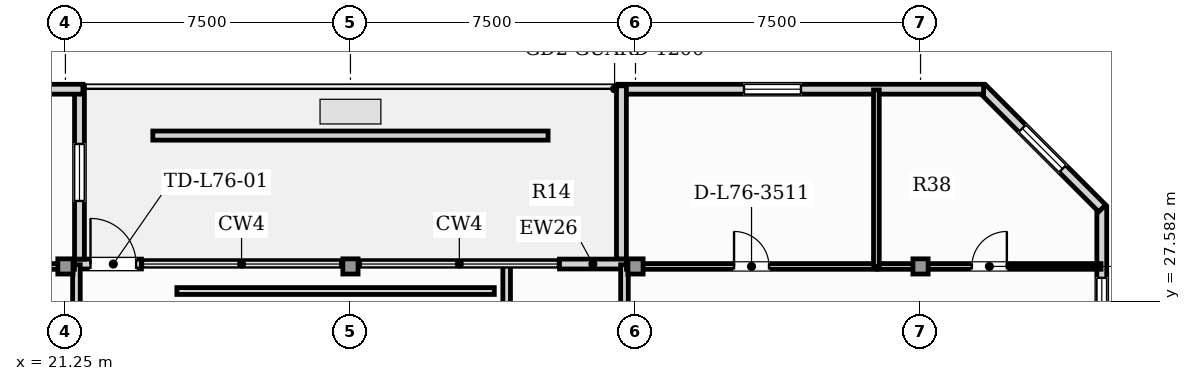
"""IFC4 building model, lengths in metres.
Left out: names, types, materials, properties, quantities, classifications, styles, units other than length and angle.
Written with IfcOpenShell. Run it as: python <this file> out.ifc"""

import sys

from ifc_helpers import new_model, si_unit, direction, frame, frame_2d, origin, origin_2d, place, context, subcontext, project, spatial, rectangle, hollow_rectangle, extrude, element, fill, save


model = new_model("IFC4")
c1 = context("Model", 3, precision=1e-05, world=origin(), true_north=direction((0.0, 1.0)))
c2 = subcontext(c1, "Body", "Model", "MODEL_VIEW")
j1 = project(units=[si_unit("LENGTHUNIT", "METRE"), si_unit("PLANEANGLEUNIT", "RADIAN")], contexts=[c1])
p1 = place(None, origin())
s1 = spatial("IfcSite", under=j1, at=p1, CompositionType="ELEMENT")
p2 = place(p1, origin())
s2 = spatial("IfcBuilding", under=s1, at=p2, CompositionType="ELEMENT")
p3 = place(p2, frame((0.0, 0.0, 308.0)))
s3 = spatial("IfcBuildingStorey", under=s2, at=p3, CompositionType="ELEMENT", Elevation=308.0)
for number, where, z_axis, x_axis in (
    (1, (21.25, 28.5, 0.0), (0.0, 0.0, 1.0), (1.0, 0.0, 0.0)),
    (2, (28.75, 28.5, 0.0), (0.0, 0.0, 1.0), (1.0, 0.0, 0.0)),
    (3, (36.25, 28.5, 0.0), (0.0, 0.0, 1.0), (1.0, 0.0, 0.0)),
    (4, (43.75, 28.5, 0.0), (0.0, 0.0, 1.0), (1.0, 0.0, 0.0)),
):
    element("IfcColumn", number, at=place(p3, frame(where, z_axis=z_axis, x_axis=x_axis)), inside=s3, PredefinedType="COLUMN", context=c2, shape_type="SweptSolid", body=[
        extrude(hollow_rectangle(XDim=0.4, YDim=0.4, WallThickness=0.02, at=origin_2d()), origin(), (0.0, 0.0, 1.0), 5.05),
    ])
p4 = place(p3, frame((48.519, 3.24, 0.0), z_axis=(0.0, 0.0, 1.0), x_axis=(0.0, 1.0, 0.0)))
e5 = element("IfcWall", 5, at=p4, inside=s3, PredefinedType="SOLIDWALL", context=c2, shape_type="SweptSolid", body=[
    extrude(rectangle(XDim=26.813, YDim=0.26, at=frame_2d((13.406, 0.0))), origin(), (0.0, 0.0, 1.0), 4.85),
])
p5 = place(p4, frame((24.06, 0.0, 0.95)))
e6 = element("IfcOpeningElement", 6, at=p5, cuts=e5, PredefinedType="OPENING", context=c2, shape_type="SweptSolid", body=[
    extrude(rectangle(XDim=0.9, YDim=1.5, at=frame_2d((0.45, 0.75))), frame((0.0, 0.14, 0.0), z_axis=(0.0, -1.0, 0.0), x_axis=(1.0, 0.0, 0.0)), (0.0, 0.0, 1.0), 0.28),
])
p6 = place(p4, frame((10.445, 0.0, 0.9)))
e7 = element("IfcOpeningElement", 7, at=p6, cuts=e5, PredefinedType="OPENING", context=c2, shape_type="SweptSolid", body=[
    extrude(rectangle(XDim=1.5, YDim=1.95, at=frame_2d((0.75, 0.975))), frame((0.0, 0.14, 0.0), z_axis=(0.0, -1.0, 0.0), x_axis=(1.0, 0.0, 0.0)), (0.0, 0.0, 1.0), 0.28),
])
p7 = place(p4, frame((17.51, 0.0, 0.9)))
e8 = element("IfcOpeningElement", 8, at=p7, cuts=e5, PredefinedType="OPENING", context=c2, shape_type="SweptSolid", body=[
    extrude(rectangle(XDim=1.5, YDim=1.95, at=frame_2d((0.75, 0.975))), frame((0.0, 0.14, 0.0), z_axis=(0.0, -1.0, 0.0), x_axis=(1.0, 0.0, 0.0)), (0.0, 0.0, 1.0), 0.28),
])
p8 = place(p3, frame((48.529, 30.03, 0.0), z_axis=(0.0, 0.0, 1.0), x_axis=(-0.707134240044, 0.707079321262, 0.0)))
e9 = element("IfcWall", 9, at=p8, inside=s3, PredefinedType="SOLIDWALL", context=c2, shape_type="SweptSolid", body=[
    extrude(rectangle(XDim=4.446, YDim=0.26, at=frame_2d((2.223, 0.0))), origin(), (0.0, 0.0, 1.0), 4.85),
])
p9 = place(p8, frame((1.473, 0.0, 0.9)))
e10 = element("IfcOpeningElement", 10, at=p9, cuts=e9, PredefinedType="OPENING", context=c2, shape_type="SweptSolid", body=[
    extrude(rectangle(XDim=1.5, YDim=1.95, at=frame_2d((0.75, 0.975))), frame((0.0, 0.14, 0.0), z_axis=(0.0, -1.0, 0.0), x_axis=(1.0, 0.0, 0.0)), (0.0, 0.0, 1.0), 0.28),
])
p10 = place(p3, frame((45.409, 33.163, 0.0), z_axis=(0.0, 0.0, 1.0), x_axis=(-1.0, 0.0, 0.0)))
e11 = element("IfcWall", 11, at=p10, inside=s3, PredefinedType="SOLIDWALL", context=c2, shape_type="SweptSolid", body=[
    extrude(rectangle(XDim=9.619, YDim=0.26, at=frame_2d((4.81, 0.0))), origin(), (0.0, 0.0, 1.0), 4.85),
])
p11 = place(p10, frame((4.805, 0.0, 0.9)))
e12 = element("IfcOpeningElement", 12, at=p11, cuts=e11, PredefinedType="OPENING", context=c2, shape_type="SweptSolid", body=[
    extrude(rectangle(XDim=1.5, YDim=1.95, at=frame_2d((0.75, 0.975))), frame((0.0, 0.14, 0.0), z_axis=(0.0, -1.0, 0.0), x_axis=(1.0, 0.0, 0.0)), (0.0, 0.0, 1.0), 0.28),
])
p12 = place(p3, frame((35.88, 33.253, 0.0), z_axis=(0.0, 0.0, 1.0), x_axis=(0.0, -1.0, 0.0)))
e13 = element("IfcWall", 13, at=p12, inside=s3, PredefinedType="SOLIDWALL", context=c2, shape_type="SweptSolid", body=[
    extrude(rectangle(XDim=4.56, YDim=0.26, at=frame_2d((2.28, 0.0))), origin(), (0.0, 0.0, 1.0), 4.85),
])
p13 = place(p3, frame((21.49, 28.563, 0.0), z_axis=(0.0, 0.0, 1.0), x_axis=(1.0, 0.0, 0.0)))
e14 = element("IfcWall", 14, at=p13, inside=s3, PredefinedType="SOLIDWALL", context=c2, shape_type="SweptSolid", body=[
    extrude(rectangle(XDim=1.76, YDim=0.26, at=frame_2d((0.88, 0.0))), origin(), (0.0, 0.0, 1.0), 4.85),
])
p14 = place(p13, frame((0.42, 0.0, 0.0)))
e15 = element("IfcOpeningElement", 15, at=p14, cuts=e14, PredefinedType="OPENING", context=c2, shape_type="SweptSolid", body=[
    extrude(rectangle(XDim=1.2, YDim=2.2, at=frame_2d((0.6, 1.1))), frame((0.0, 0.14, 0.0), z_axis=(0.0, -1.0, 0.0), x_axis=(1.0, 0.0, 0.0)), (0.0, 0.0, 1.0), 0.28),
])
p15 = place(p3, frame((34.25, 28.563, 0.0), z_axis=(0.0, 0.0, 1.0), x_axis=(1.0, 0.0, 0.0)))
e16 = element("IfcWall", 16, at=p15, inside=s3, PredefinedType="SOLIDWALL", context=c2, shape_type="SweptSolid", body=[
    extrude(rectangle(XDim=1.76, YDim=0.26, at=frame_2d((0.88, 0.0))), origin(), (0.0, 0.0, 1.0), 4.85),
])
p16 = place(p3, frame((21.62, 28.693, 0.0), z_axis=(0.0, 0.0, 1.0), x_axis=(0.0, 1.0, 0.0)))
e17 = element("IfcWall", 17, at=p16, inside=s3, PredefinedType="SOLIDWALL", context=c2, shape_type="SweptSolid", body=[
    extrude(rectangle(XDim=4.56, YDim=0.26, at=frame_2d((2.28, 0.0))), origin(), (0.0, 0.0, 1.0), 4.85),
])
p17 = place(p16, frame((1.53, 0.0, 0.9)))
e18 = element("IfcOpeningElement", 18, at=p17, cuts=e17, PredefinedType="OPENING", context=c2, shape_type="SweptSolid", body=[
    extrude(rectangle(XDim=1.5, YDim=1.95, at=frame_2d((0.75, 0.975))), frame((0.0, 0.14, 0.0), z_axis=(0.0, -1.0, 0.0), x_axis=(1.0, 0.0, 0.0)), (0.0, 0.0, 1.0), 0.28),
])
p18 = place(p3, frame((21.71, 33.163, 0.0), z_axis=(0.0, 0.0, 1.0), x_axis=(-1.0, 0.0, 0.0)))
e19 = element("IfcWall", 19, at=p18, inside=s3, PredefinedType="SOLIDWALL", context=c2, shape_type="SweptSolid", body=[
    extrude(rectangle(XDim=9.619, YDim=0.26, at=frame_2d((4.81, 0.0))), origin(), (0.0, 0.0, 1.0), 4.85),
])
p19 = place(p18, frame((6.115, 0.0, 0.9)))
e20 = element("IfcOpeningElement", 20, at=p19, cuts=e19, PredefinedType="OPENING", context=c2, shape_type="SweptSolid", body=[
    extrude(rectangle(XDim=1.5, YDim=1.95, at=frame_2d((0.75, 0.975))), frame((0.0, 0.14, 0.0), z_axis=(0.0, -1.0, 0.0), x_axis=(1.0, 0.0, 0.0)), (0.0, 0.0, 1.0), 0.28),
])
p20 = place(p3, frame((23.55, 31.943, 0.0), z_axis=(0.0, 0.0, 1.0), x_axis=(1.0, 0.0, 0.0)))
e21 = element("IfcWall", 21, at=p20, inside=s3, PredefinedType="PARAPET", context=c2, shape_type="SweptSolid", body=[
    extrude(rectangle(XDim=10.4, YDim=0.24, at=frame_2d((5.2, 0.0))), origin(), (0.0, 0.0, 1.0), 0.55),
])
p21 = place(p3, frame((32.86, 16.685, 0.0), z_axis=(0.0, 0.0, 1.0), x_axis=(0.0, 1.0, 0.0)))
e22 = element("IfcWall", 22, at=p21, inside=s3, PredefinedType="PARTITIONING", context=c2, shape_type="SweptSolid", body=[
    extrude(rectangle(XDim=11.86, YDim=0.2, at=frame_2d((5.93, 0.0))), origin(), (0.0, 0.0, 1.0), 4.85),
])
p22 = place(p21, frame((5.47, 0.0, 0.0)))
e23 = element("IfcOpeningElement", 23, at=p22, cuts=e22, PredefinedType="OPENING", context=c2, shape_type="SweptSolid", body=[
    extrude(rectangle(XDim=0.92, YDim=2.1, at=frame_2d((0.46, 1.05))), frame((0.0, 0.11, 0.0), z_axis=(0.0, -1.0, 0.0), x_axis=(1.0, 0.0, 0.0)), (0.0, 0.0, 1.0), 0.22),
])
for number, where, z_axis, x_axis in (
    (24, (21.54, 26.995, 0.0), (0.0, 0.0, 1.0), (0.0, 1.0, 0.0)),
    (25, (35.96, 26.995, 0.0), (0.0, 0.0, 1.0), (0.0, 1.0, 0.0)),
):
    element("IfcWall", number, at=place(p3, frame(where, z_axis=z_axis, x_axis=x_axis)), inside=s3, PredefinedType="PARTITIONING", context=c2, shape_type="SweptSolid", body=[
        extrude(rectangle(XDim=1.549, YDim=0.2, at=frame_2d((0.774, 0.0))), origin(), (0.0, 0.0, 1.0), 4.85),
    ])
p23 = place(p3, frame((16.304, 28.5, 0.0), z_axis=(0.0, 0.0, 1.0), x_axis=(1.0, 0.0, 0.0)))
e26 = element("IfcWall", 26, at=p23, inside=s3, PredefinedType="PARTITIONING", context=c2, shape_type="SweptSolid", body=[
    extrude(rectangle(XDim=5.183, YDim=0.15, at=frame_2d((2.591, 0.0))), origin(), (0.0, 0.0, 1.0), 4.317),
])
p24 = place(p23, frame((2.131, 0.0, 0.0)))
e27 = element("IfcOpeningElement", 27, at=p24, cuts=e26, PredefinedType="OPENING", context=c2, shape_type="SweptSolid", body=[
    extrude(rectangle(XDim=0.92, YDim=2.1, at=frame_2d((0.46, 1.05))), frame((0.0, 0.085, 0.0), z_axis=(0.0, -1.0, 0.0), x_axis=(1.0, 0.0, 0.0)), (0.0, 0.0, 1.0), 0.17),
])
p25 = place(p3, frame((36.013, 28.5, 0.0), z_axis=(0.0, 0.0, 1.0), x_axis=(1.0, 0.0, 0.0)))
e28 = element("IfcWall", 28, at=p25, inside=s3, PredefinedType="PARTITIONING", context=c2, shape_type="SweptSolid", body=[
    extrude(rectangle(XDim=6.58, YDim=0.15, at=frame_2d((3.29, 0.0))), origin(), (0.0, 0.0, 1.0), 4.317),
])
p26 = place(p25, frame((2.83, 0.0, 0.0)))
e29 = element("IfcOpeningElement", 29, at=p26, cuts=e28, PredefinedType="OPENING", context=c2, shape_type="SweptSolid", body=[
    extrude(rectangle(XDim=0.92, YDim=2.1, at=frame_2d((0.46, 1.05))), frame((0.0, 0.085, 0.0), z_axis=(0.0, -1.0, 0.0), x_axis=(1.0, 0.0, 0.0)), (0.0, 0.0, 1.0), 0.17),
])
p27 = place(p3, frame((42.623, 28.5, 0.0), z_axis=(0.0, 0.0, 1.0), x_axis=(1.0, 0.0, 0.0)))
e30 = element("IfcWall", 30, at=p27, inside=s3, PredefinedType="PARTITIONING", context=c2, shape_type="SweptSolid", body=[
    extrude(rectangle(XDim=5.876, YDim=0.15, at=frame_2d((2.938, 0.0))), origin(), (0.0, 0.0, 1.0), 4.317),
])
p28 = place(p27, frame((2.478, 0.0, 0.0)))
e31 = element("IfcOpeningElement", 31, at=p28, cuts=e30, PredefinedType="OPENING", context=c2, shape_type="SweptSolid", body=[
    extrude(rectangle(XDim=0.92, YDim=2.1, at=frame_2d((0.46, 1.05))), frame((0.0, 0.085, 0.0), z_axis=(0.0, -1.0, 0.0), x_axis=(1.0, 0.0, 0.0)), (0.0, 0.0, 1.0), 0.17),
])
p29 = place(p3, frame((42.588, 28.495, 0.0), z_axis=(0.0, 0.0, 1.0), x_axis=(0.0, 1.0, 0.0)))
e32 = element("IfcWall", 32, at=p29, inside=s3, PredefinedType="PARTITIONING", context=c2, shape_type="SweptSolid", body=[
    extrude(rectangle(XDim=4.648, YDim=0.15, at=frame_2d((2.324, 0.0))), origin(), (0.0, 0.0, 1.0), 4.85),
])
p30 = place(p3, frame((24.183, 27.853, 0.0), z_axis=(0.0, 0.0, 1.0), x_axis=(1.0, 0.0, 0.0)))
e33 = element("IfcWall", 33, at=p30, inside=s3, PredefinedType="PARTITIONING", context=c2, shape_type="SweptSolid", body=[
    extrude(rectangle(XDim=8.352, YDim=0.18, at=frame_2d((4.176, 0.0))), origin(), (0.0, 0.0, 1.0), 4.85),
])
p31 = place(p14, origin())
e34 = element("IfcDoor", 34, at=p31, inside=s3, OperationType="SINGLE_SWING_LEFT", PredefinedType="DOOR", context=c2, shape_type="SweptSolid", body=[
    extrude(rectangle(XDim=1.2, YDim=2.2, at=frame_2d((0.6, 1.1))), frame((0.0, 0.025, 0.0), z_axis=(0.0, -1.0, 0.0), x_axis=(1.0, 0.0, 0.0)), (0.0, 0.0, 1.0), 0.05),
])
fill(e15, e34)
p32 = place(p17, origin())
e35 = element("IfcWindow", 35, at=p32, inside=s3, PartitioningType="SINGLE_PANEL", PredefinedType="WINDOW", context=c2, shape_type="SweptSolid", body=[
    extrude(rectangle(XDim=1.5, YDim=1.95, at=frame_2d((0.75, 0.975))), frame((0.0, 0.03, 0.0), z_axis=(0.0, -1.0, 0.0), x_axis=(1.0, 0.0, 0.0)), (0.0, 0.0, 1.0), 0.06),
])
fill(e18, e35)
p33 = place(p5, origin())
e36 = element("IfcWindow", 36, at=p33, inside=s3, PartitioningType="SINGLE_PANEL", PredefinedType="WINDOW", context=c2, shape_type="SweptSolid", body=[
    extrude(rectangle(XDim=0.9, YDim=1.5, at=frame_2d((0.45, 0.75))), frame((0.0, 0.03, 0.0), z_axis=(0.0, -1.0, 0.0), x_axis=(1.0, 0.0, 0.0)), (0.0, 0.0, 1.0), 0.06),
])
fill(e6, e36)
p34 = place(p11, origin())
e37 = element("IfcWindow", 37, at=p34, inside=s3, PartitioningType="SINGLE_PANEL", PredefinedType="WINDOW", context=c2, shape_type="SweptSolid", body=[
    extrude(rectangle(XDim=1.5, YDim=1.95, at=frame_2d((0.75, 0.975))), frame((0.0, 0.03, 0.0), z_axis=(0.0, -1.0, 0.0), x_axis=(1.0, 0.0, 0.0)), (0.0, 0.0, 1.0), 0.06),
])
fill(e12, e37)
p35 = place(p9, origin())
e38 = element("IfcWindow", 38, at=p35, inside=s3, PartitioningType="SINGLE_PANEL", PredefinedType="WINDOW", context=c2, shape_type="SweptSolid", body=[
    extrude(rectangle(XDim=1.5, YDim=1.95, at=frame_2d((0.75, 0.975))), frame((0.0, 0.03, 0.0), z_axis=(0.0, -1.0, 0.0), x_axis=(1.0, 0.0, 0.0)), (0.0, 0.0, 1.0), 0.06),
])
fill(e10, e38)
p36 = place(p26, origin())
e39 = element("IfcDoor", 39, at=p36, inside=s3, OperationType="SINGLE_SWING_LEFT", PredefinedType="DOOR", context=c2, shape_type="SweptSolid", body=[
    extrude(rectangle(XDim=0.92, YDim=2.1, at=frame_2d((0.46, 1.05))), frame((0.0, 0.025, 0.0), z_axis=(0.0, -1.0, 0.0), x_axis=(1.0, 0.0, 0.0)), (0.0, 0.0, 1.0), 0.05),
])
fill(e29, e39)
p37 = place(p28, origin())
e40 = element("IfcDoor", 40, at=p37, inside=s3, OperationType="SINGLE_SWING_RIGHT", PredefinedType="DOOR", context=c2, shape_type="SweptSolid", body=[
    extrude(rectangle(XDim=0.92, YDim=2.1, at=frame_2d((0.46, 1.05))), frame((0.0, 0.025, 0.0), z_axis=(0.0, -1.0, 0.0), x_axis=(1.0, 0.0, 0.0)), (0.0, 0.0, 1.0), 0.05),
])
fill(e31, e40)
save(model, sys.argv[1])
